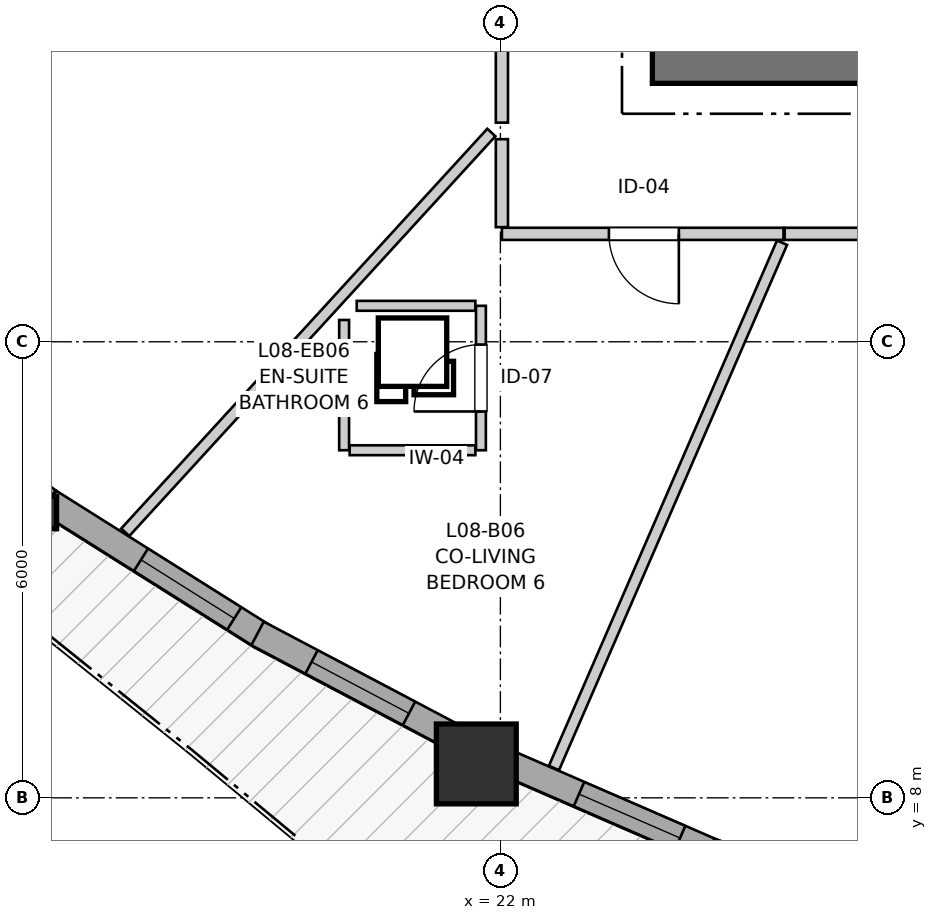
"""IFC4 building model, lengths in metres.
Left out: names, types, materials, properties, quantities, classifications, styles, units other than length and angle.
Written with IfcOpenShell. Run it as: python <this file> out.ifc"""

import sys

from ifc_helpers import new_model, si_unit, direction, frame, frame_2d, origin, origin_2d, place, context, subcontext, project, spatial, rectangle, i_section, extrude, source, transform, mapped, element, fill, save


model = new_model("IFC4")
c1 = context("Model", 3, precision=1e-05, world=origin(), true_north=direction((0.0, 1.0)))
c2 = subcontext(c1, "Body", "Model", "MODEL_VIEW")
j1 = project(units=[si_unit("LENGTHUNIT", "METRE"), si_unit("PLANEANGLEUNIT", "RADIAN")], contexts=[c1])
p1 = place(None, origin())
s1 = spatial("IfcSite", under=j1, at=p1, CompositionType="ELEMENT")
p2 = place(p1, origin())
s2 = spatial("IfcBuilding", under=s1, at=p2, CompositionType="ELEMENT")
p3 = place(p2, frame((0.0, 0.0, 30.2)))
s3 = spatial("IfcBuildingStorey", under=s2, at=p3, CompositionType="ELEMENT", Elevation=30.2)
p4 = place(p3, frame((24.0, 17.8, 0.0), z_axis=(0.0, 0.0, 1.0), x_axis=(1.0, 0.0, 0.0)))
e1 = element("IfcWall", 1, at=p4, inside=s3, PredefinedType="SHEAR", context=c2, shape_type="SweptSolid", body=[
    extrude(rectangle(XDim=12.7, YDim=0.8, at=frame_2d((6.35, 0.0))), origin(), (0.0, 0.0, 1.0), 2.935),
])
m1 = source(origin(), c2, "Body", "SweptSolid", [
    extrude(i_section(OverallWidth=0.409, OverallDepth=0.425, WebThickness=0.03, FlangeThickness=0.048, FilletRadius=0.015, at=origin_2d()), origin(), (0.0, 0.0, 1.0), 2.935),
])
p5 = place(p3, frame((15.956, 11.753, 0.0), z_axis=(0.0, 0.0, 1.0), x_axis=(1.0, 0.0, 0.0)))
e2 = element("IfcColumn", 2, at=p5, inside=s3, PredefinedType="PILASTER", context=c2, shape_type="MappedRepresentation", body=[
    mapped(m1, transform((0.0, 0.0, 0.0), x_axis=(1.0, 0.0, 0.0), y_axis=(0.0, 1.0, 0.0), z_axis=(0.0, 0.0, 1.0), scale=1.0)),
])
m2 = source(origin(), c2, "Body", "SweptSolid", [
    extrude(rectangle(XDim=1.05, YDim=1.05, at=origin_2d()), origin(), (0.0, 0.0, 1.0), 2.935),
])
p6 = place(p3, frame((21.683, 8.446, 0.0), z_axis=(0.0, 0.0, 1.0), x_axis=(1.0, 0.0, 0.0)))
e3 = element("IfcColumn", 3, at=p6, inside=s3, PredefinedType="COLUMN", context=c2, shape_type="MappedRepresentation", body=[
    mapped(m2, transform((0.0, 0.0, 0.0), x_axis=(1.0, 0.0, 0.0), y_axis=(0.0, 1.0, 0.0), z_axis=(0.0, 0.0, 1.0), scale=1.0)),
])
p7 = place(p3, frame((13.355, 13.896, 0.0), z_axis=(0.0, 0.0, 1.0), x_axis=(0.803836316566, -0.594850549441, 0.0)))
e4 = element("IfcWall", 4, at=p7, inside=s3, PredefinedType="SOLIDWALL", context=c2, shape_type="SweptSolid", body=[
    extrude(rectangle(XDim=3.346, YDim=0.35, at=frame_2d((1.673, 0.0))), origin(), (0.0, 0.0, 1.0), 2.415),
])
p8 = place(p7, frame((1.108, 0.0, 0.82)))
e5 = element("IfcOpeningElement", 5, at=p8, cuts=e4, PredefinedType="OPENING", context=c2, shape_type="SweptSolid", body=[
    extrude(rectangle(XDim=1.15, YDim=1.2, at=frame_2d((0.575, 0.6))), frame((0.0, 0.185, 0.0), z_axis=(0.0, -1.0, 0.0), x_axis=(1.0, 0.0, 0.0)), (0.0, 0.0, 1.0), 0.37),
])
p9 = place(p3, frame((16.066, 11.89, 0.0), z_axis=(0.0, 0.0, 1.0), x_axis=(0.846403135518, -0.532542704565, 0.0)))
e6 = element("IfcWall", 6, at=p9, inside=s3, PredefinedType="SOLIDWALL", context=c2, shape_type="SweptSolid", body=[
    extrude(rectangle(XDim=3.327, YDim=0.35, at=frame_2d((1.664, 0.0))), origin(), (0.0, 0.0, 1.0), 2.415),
])
p10 = place(p9, frame((1.424, 0.0, 0.82)))
e7 = element("IfcOpeningElement", 7, at=p10, cuts=e6, PredefinedType="OPENING", context=c2, shape_type="SweptSolid", body=[
    extrude(rectangle(XDim=1.45, YDim=1.25, at=frame_2d((0.725, 0.625))), frame((0.0, 0.185, 0.0), z_axis=(0.0, -1.0, 0.0), x_axis=(1.0, 0.0, 0.0)), (0.0, 0.0, 1.0), 0.37),
])
p11 = place(p3, frame((18.805, 10.163, 0.0), z_axis=(0.0, 0.0, 1.0), x_axis=(0.884387509242, -0.466753396877, 0.0)))
e8 = element("IfcWall", 8, at=p11, inside=s3, PredefinedType="SOLIDWALL", context=c2, shape_type="SweptSolid", body=[
    extrude(rectangle(XDim=3.047, YDim=0.35, at=frame_2d((1.523, 0.0))), origin(), (0.0, 0.0, 1.0), 2.415),
])
p12 = place(p11, frame((0.803, 0.0, 0.82)))
e9 = element("IfcOpeningElement", 9, at=p12, cuts=e8, PredefinedType="OPENING", context=c2, shape_type="SweptSolid", body=[
    extrude(rectangle(XDim=1.45, YDim=1.25, at=frame_2d((0.725, 0.625))), frame((0.0, 0.185, 0.0), z_axis=(0.0, -1.0, 0.0), x_axis=(1.0, 0.0, 0.0)), (0.0, 0.0, 1.0), 0.37),
])
p13 = place(p3, frame((22.028, 8.487, 0.0), z_axis=(0.0, 0.0, 1.0), x_axis=(0.917081449464, -0.398699906006, 0.0)))
e10 = element("IfcWall", 10, at=p13, inside=s3, PredefinedType="SOLIDWALL", context=c2, shape_type="SweptSolid", body=[
    extrude(rectangle(XDim=3.066, YDim=0.35, at=frame_2d((1.533, 0.0))), origin(), (0.0, 0.0, 1.0), 2.415),
])
p14 = place(p13, frame((1.097, 0.0, 0.82)))
e11 = element("IfcOpeningElement", 11, at=p14, cuts=e10, PredefinedType="OPENING", context=c2, shape_type="SweptSolid", body=[
    extrude(rectangle(XDim=1.45, YDim=1.25, at=frame_2d((0.725, 0.625))), frame((0.0, 0.185, 0.0), z_axis=(0.0, -1.0, 0.0), x_axis=(1.0, 0.0, 0.0)), (0.0, 0.0, 1.0), 0.37),
])
p15 = place(p3, frame((24.757, 7.297, 0.0), z_axis=(0.0, 0.0, 1.0), x_axis=(0.944122401027, -0.329595042254, 0.0)))
e12 = element("IfcWall", 12, at=p15, inside=s3, PredefinedType="SOLIDWALL", context=c2, shape_type="SweptSolid", body=[
    extrude(rectangle(XDim=3.384, YDim=0.35, at=frame_2d((1.692, 0.0))), origin(), (0.0, 0.0, 1.0), 2.415),
])
p16 = place(p15, frame((0.977, 0.0, 0.82)))
e13 = element("IfcOpeningElement", 13, at=p16, cuts=e12, PredefinedType="OPENING", context=c2, shape_type="SweptSolid", body=[
    extrude(rectangle(XDim=1.45, YDim=1.25, at=frame_2d((0.725, 0.625))), frame((0.0, 0.185, 0.0), z_axis=(0.0, -1.0, 0.0), x_axis=(1.0, 0.0, 0.0)), (0.0, 0.0, 1.0), 0.37),
])
p17 = place(p3, frame((22.02, 16.883, 0.0), z_axis=(0.0, 0.0, 1.0), x_axis=(0.0, 1.0, 0.0)))
e14 = element("IfcWall", 14, at=p17, inside=s3, PredefinedType="PARTITIONING", context=c2, shape_type="SweptSolid", body=[
    extrude(rectangle(XDim=7.267, YDim=0.16, at=frame_2d((3.633, 0.0))), origin(), (0.0, 0.0, 1.0), 2.935),
])
p18 = place(p17, frame((2.845, 0.0, 0.0)))
e15 = element("IfcOpeningElement", 15, at=p18, cuts=e14, PredefinedType="OPENING", context=c2, shape_type="SweptSolid", body=[
    extrude(rectangle(XDim=1.3, YDim=2.1, at=frame_2d((0.65, 1.05))), frame((0.0, 0.09, 0.0), z_axis=(0.0, -1.0, 0.0), x_axis=(1.0, 0.0, 0.0)), (0.0, 0.0, 1.0), 0.18),
])
p19 = place(p3, frame((31.294, 15.42, 0.0), z_axis=(0.0, 0.0, 1.0), x_axis=(-1.0, 0.0, 0.0)))
e16 = element("IfcWall", 16, at=p19, inside=s3, PredefinedType="PARTITIONING", context=c2, shape_type="SweptSolid", body=[
    extrude(rectangle(XDim=5.554, YDim=0.16, at=frame_2d((2.777, 0.0))), origin(), (0.0, 0.0, 1.0), 2.935),
])
p20 = place(p19, frame((2.126, 0.0, 0.0)))
e17 = element("IfcOpeningElement", 17, at=p20, cuts=e16, PredefinedType="OPENING", context=c2, shape_type="SweptSolid", body=[
    extrude(rectangle(XDim=1.3, YDim=2.1, at=frame_2d((0.65, 1.05))), frame((0.0, 0.09, 0.0), z_axis=(0.0, -1.0, 0.0), x_axis=(1.0, 0.0, 0.0)), (0.0, 0.0, 1.0), 0.18),
])
p21 = place(p3, frame((25.725, 15.42, 0.0), z_axis=(0.0, 0.0, 1.0), x_axis=(-1.0, 0.0, 0.0)))
e18 = element("IfcWall", 18, at=p21, inside=s3, PredefinedType="PARTITIONING", context=c2, shape_type="SweptSolid", body=[
    extrude(rectangle(XDim=3.705, YDim=0.16, at=frame_2d((1.853, 0.0))), origin(), (0.0, 0.0, 1.0), 2.935),
])
p22 = place(p21, frame((1.377, 0.0, 0.0)))
e19 = element("IfcOpeningElement", 19, at=p22, cuts=e18, PredefinedType="OPENING", context=c2, shape_type="SweptSolid", body=[
    extrude(rectangle(XDim=0.92, YDim=2.1, at=frame_2d((0.46, 1.05))), frame((0.0, 0.09, 0.0), z_axis=(0.0, -1.0, 0.0), x_axis=(1.0, 0.0, 0.0)), (0.0, 0.0, 1.0), 0.18),
])
p23 = place(p3, frame((21.744, 12.573, 0.0), z_axis=(0.0, 0.0, 1.0), x_axis=(0.0, 1.0, 0.0)))
e20 = element("IfcWall", 20, at=p23, inside=s3, PredefinedType="PARTITIONING", context=c2, shape_type="SweptSolid", body=[
    extrude(rectangle(XDim=1.9, YDim=0.13, at=frame_2d((0.95, 0.0))), origin(), (0.0, 0.0, 1.0), 2.935),
])
p24 = place(p23, frame((0.51, 0.0, 0.0)))
e21 = element("IfcOpeningElement", 21, at=p24, cuts=e20, PredefinedType="OPENING", context=c2, shape_type="SweptSolid", body=[
    extrude(rectangle(XDim=0.88, YDim=2.05, at=frame_2d((0.44, 1.025))), frame((0.0, 0.075, 0.0), z_axis=(0.0, -1.0, 0.0), x_axis=(1.0, 0.0, 0.0)), (0.0, 0.0, 1.0), 0.15),
])
p25 = place(p3, frame((22.705, 8.392, 0.0), z_axis=(0.0, 0.0, 1.0), x_axis=(0.398228422372, 0.917286282256, 0.0)))
e22 = element("IfcWall", 22, at=p25, inside=s3, PredefinedType="PARTITIONING", context=c2, shape_type="SweptSolid", body=[
    extrude(rectangle(XDim=7.535, YDim=0.145, at=frame_2d((3.767, 0.0))), origin(), (0.0, 0.0, 1.0), 2.935),
])
p26 = place(p3, frame((17.064, 11.493, 0.0), z_axis=(0.0, 0.0, 1.0), x_axis=(0.67534166785, 0.737505004502, 0.0)))
e23 = element("IfcWall", 23, at=p26, inside=s3, PredefinedType="PARTITIONING", context=c2, shape_type="SweptSolid", body=[
    extrude(rectangle(XDim=7.132, YDim=0.145, at=frame_2d((3.566, 0.0))), origin(), (0.0, 0.0, 1.0), 2.935),
])
p27 = place(p3, frame((19.944, 12.573, 0.0), z_axis=(0.0, 0.0, 1.0), x_axis=(0.0, 1.0, 0.0)))
e24 = element("IfcWall", 24, at=p27, inside=s3, PredefinedType="PARTITIONING", context=c2, shape_type="SweptSolid", body=[
    extrude(rectangle(XDim=1.714, YDim=0.13, at=frame_2d((0.857, 0.0))), origin(), (0.0, 0.0, 1.0), 2.935),
])
p28 = place(p3, frame((20.11, 14.473, 0.0), z_axis=(0.0, 0.0, 1.0), x_axis=(1.0, 0.0, 0.0)))
e25 = element("IfcWall", 25, at=p28, inside=s3, PredefinedType="PARTITIONING", context=c2, shape_type="SweptSolid", body=[
    extrude(rectangle(XDim=1.561, YDim=0.13, at=frame_2d((0.781, 0.0))), origin(), (0.0, 0.0, 1.0), 2.935),
])
p29 = place(p3, frame((20.017, 12.573, 0.0), z_axis=(0.0, 0.0, 1.0), x_axis=(1.0, 0.0, 0.0)))
e26 = element("IfcWall", 26, at=p29, inside=s3, PredefinedType="PARTITIONING", context=c2, shape_type="SweptSolid", body=[
    extrude(rectangle(XDim=1.654, YDim=0.13, at=frame_2d((0.827, 0.0))), origin(), (0.0, 0.0, 1.0), 2.935),
])
p30 = place(p3, frame((22.02, 15.508, 0.0), z_axis=(0.0, 0.0, 1.0), x_axis=(0.0, 1.0, 0.0)))
e27 = element("IfcWall", 27, at=p30, inside=s3, PredefinedType="PARTITIONING", context=c2, shape_type="SweptSolid", body=[
    extrude(rectangle(XDim=1.157, YDim=0.16, at=frame_2d((0.579, 0.0))), origin(), (0.0, 0.0, 1.0), 2.935),
])
m3 = source(origin(), c2, "Body", "SweptSolid", [
    extrude(rectangle(XDim=1.45, YDim=1.25, at=frame_2d((0.725, 0.625))), frame((0.0, 0.03, 0.0), z_axis=(0.0, -1.0, 0.0), x_axis=(1.0, 0.0, 0.0)), (0.0, 0.0, 1.0), 0.06),
])
p31 = place(p10, origin())
e28 = element("IfcWindow", 28, at=p31, inside=s3, PartitioningType="SINGLE_PANEL", PredefinedType="WINDOW", context=c2, shape_type="MappedRepresentation", body=[
    mapped(m3, transform((0.0, 0.0, 0.0), x_axis=(1.0, 0.0, 0.0), y_axis=(0.0, 1.0, 0.0), z_axis=(0.0, 0.0, 1.0), scale=1.0)),
])
fill(e7, e28)
p32 = place(p12, origin())
e29 = element("IfcWindow", 29, at=p32, inside=s3, PartitioningType="SINGLE_PANEL", PredefinedType="WINDOW", context=c2, shape_type="MappedRepresentation", body=[
    mapped(m3, transform((0.0, 0.0, 0.0), x_axis=(1.0, 0.0, 0.0), y_axis=(0.0, 1.0, 0.0), z_axis=(0.0, 0.0, 1.0), scale=1.0)),
])
fill(e9, e29)
p33 = place(p14, origin())
e30 = element("IfcWindow", 30, at=p33, inside=s3, PartitioningType="SINGLE_PANEL", PredefinedType="WINDOW", context=c2, shape_type="MappedRepresentation", body=[
    mapped(m3, transform((0.0, 0.0, 0.0), x_axis=(1.0, 0.0, 0.0), y_axis=(0.0, 1.0, 0.0), z_axis=(0.0, 0.0, 1.0), scale=1.0)),
])
fill(e11, e30)
m4 = source(origin(), c2, "Body", "SweptSolid", [
    extrude(rectangle(XDim=0.92, YDim=2.1, at=frame_2d((0.46, 1.05))), frame((0.0, 0.025, 0.0), z_axis=(0.0, -1.0, 0.0), x_axis=(1.0, 0.0, 0.0)), (0.0, 0.0, 1.0), 0.05),
])
p34 = place(p22, origin())
e31 = element("IfcDoor", 31, at=p34, inside=s3, OperationType="SINGLE_SWING_LEFT", PredefinedType="DOOR", context=c2, shape_type="MappedRepresentation", body=[
    mapped(m4, transform((0.0, 0.0, 0.0), x_axis=(1.0, 0.0, 0.0), y_axis=(0.0, 1.0, 0.0), z_axis=(0.0, 0.0, 1.0), scale=1.0)),
])
fill(e19, e31)
m5 = source(origin(), c2, "Body", "SweptSolid", [
    extrude(rectangle(XDim=0.88, YDim=2.05, at=frame_2d((0.44, 1.025))), frame((0.0, 0.025, 0.0), z_axis=(0.0, -1.0, 0.0), x_axis=(1.0, 0.0, 0.0)), (0.0, 0.0, 1.0), 0.05),
])
p35 = place(p24, origin())
e32 = element("IfcDoor", 32, at=p35, inside=s3, OperationType="SINGLE_SWING_LEFT", PredefinedType="DOOR", context=c2, shape_type="MappedRepresentation", body=[
    mapped(m5, transform((0.0, 0.0, 0.0), x_axis=(1.0, 0.0, 0.0), y_axis=(0.0, 1.0, 0.0), z_axis=(0.0, 0.0, 1.0), scale=1.0)),
])
fill(e21, e32)
save(model, sys.argv[1])
